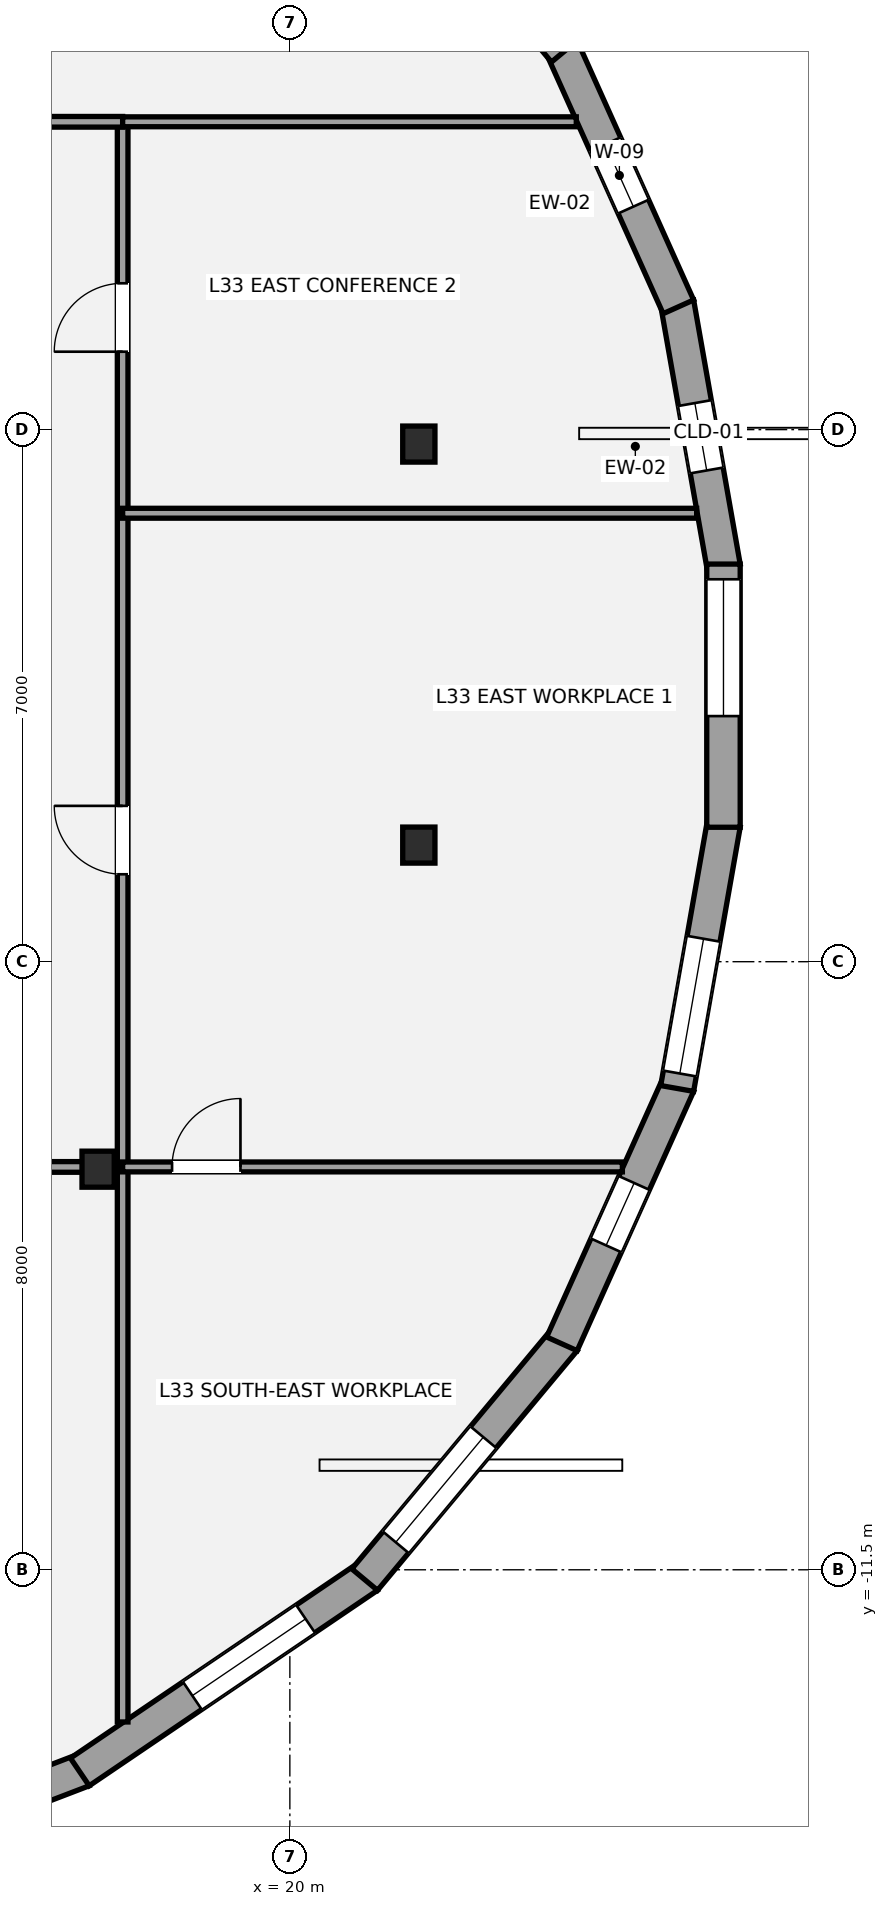
"""IFC4 building model, lengths in metres.
Left out: names, types, materials, properties, quantities, classifications, styles, units other than length and angle.
Written with IfcOpenShell. Run it as: python <this file> out.ifc"""

import sys

from ifc_helpers import new_model, si_unit, direction, frame, frame_2d, origin, origin_2d, place, context, subcontext, project, spatial, rectangle, i_section, extrude, element, fill, save


model = new_model("IFC4")
c1 = context("Model", 3, precision=1e-05, world=origin(), true_north=direction((0.0, 1.0)))
c2 = subcontext(c1, "Body", "Model", "MODEL_VIEW")
j1 = project(units=[si_unit("LENGTHUNIT", "METRE"), si_unit("PLANEANGLEUNIT", "RADIAN")], contexts=[c1])
p1 = place(None, origin())
s1 = spatial("IfcSite", under=j1, at=p1, CompositionType="ELEMENT")
p2 = place(p1, origin())
s2 = spatial("IfcBuilding", under=s1, at=p2, CompositionType="ELEMENT")
p3 = place(p2, frame((0.0, 0.0, 124.6)))
s3 = spatial("IfcBuildingStorey", under=s2, at=p3, CompositionType="ELEMENT", Elevation=124.6)
for number, where, z_axis, x_axis in (
    (1, (21.697, 3.31, 0.0), (0.0, 0.0, 1.0), (1.0, 0.0, 0.0)),
    (2, (17.477, -6.229, 0.0), (0.0, 0.0, 1.0), (1.0, 0.0, 0.0)),
    (3, (21.697, -1.966, 0.0), (0.0, 0.0, 1.0), (1.0, 0.0, 0.0)),
):
    element("IfcColumn", number, at=place(p3, frame(where, z_axis=z_axis, x_axis=x_axis)), inside=s3, PredefinedType="COLUMN", context=c2, shape_type="SweptSolid", body=[
        extrude(i_section(OverallWidth=0.424, OverallDepth=0.474, WebThickness=0.048, FlangeThickness=0.077, at=origin_2d()), origin(), (0.0, 0.0, 1.0), 3.5),
    ])
p4 = place(p3, frame((25.096, 5.168, 0.0), z_axis=(0.0, 0.0, 1.0), x_axis=(0.173615589384, -0.98481349865, 0.0)))
e4 = element("IfcWall", 4, at=p4, inside=s3, PredefinedType="STANDARD", context=c2, shape_type="SweptSolid", body=[
    extrude(rectangle(XDim=3.528, YDim=0.44, at=frame_2d((1.764, 0.0))), origin(), (0.0, 0.0, 1.0), 2.528),
])
p5 = place(p4, frame((1.339, 0.0, 0.58)))
e5 = element("IfcOpeningElement", 5, at=p5, cuts=e4, PredefinedType="OPENING", context=c2, shape_type="SweptSolid", body=[
    extrude(rectangle(XDim=0.9, YDim=1.35, at=frame_2d((0.45, 0.675))), frame((0.0, 0.23, 0.0), z_axis=(0.0, -1.0, 0.0), x_axis=(1.0, 0.0, 0.0)), (0.0, 0.0, 1.0), 0.46),
])
p6 = place(p3, frame((23.579, 8.528, 0.0), z_axis=(0.0, 0.0, 1.0), x_axis=(0.409835385481, -0.912159501846, 0.0)))
e6 = element("IfcWall", 6, at=p6, inside=s3, PredefinedType="STANDARD", context=c2, shape_type="SweptSolid", body=[
    extrude(rectangle(XDim=3.74, YDim=0.44, at=frame_2d((1.87, 0.0))), origin(), (0.0, 0.0, 1.0), 2.528),
])
p7 = place(p6, frame((1.395, 0.0, 0.58)))
e7 = element("IfcOpeningElement", 7, at=p7, cuts=e6, PredefinedType="OPENING", context=c2, shape_type="SweptSolid", body=[
    extrude(rectangle(XDim=0.9, YDim=1.35, at=frame_2d((0.45, 0.675))), frame((0.0, 0.23, 0.0), z_axis=(0.0, -1.0, 0.0), x_axis=(1.0, 0.0, 0.0)), (0.0, 0.0, 1.0), 0.46),
])
p8 = place(p3, frame((20.984, 11.629, 0.0), z_axis=(0.0, 0.0, 1.0), x_axis=(0.640084904994, -0.768304180906, 0.0)))
e8 = element("IfcWall", 8, at=p8, inside=s3, PredefinedType="STANDARD", context=c2, shape_type="SweptSolid", body=[
    extrude(rectangle(XDim=4.103, YDim=0.44, at=frame_2d((2.052, 0.0))), origin(), (0.0, 0.0, 1.0), 2.528),
])
p9 = place(p8, frame((1.664, 0.0, 0.65)))
e9 = element("IfcOpeningElement", 9, at=p9, cuts=e8, PredefinedType="OPENING", context=c2, shape_type="SweptSolid", body=[
    extrude(rectangle(XDim=1.8, YDim=1.7, at=frame_2d((0.9, 0.85))), frame((0.0, 0.23, 0.0), z_axis=(0.0, -1.0, 0.0), x_axis=(1.0, 0.0, 0.0)), (0.0, 0.0, 1.0), 0.46),
])
p10 = place(p3, frame((17.281, -14.136, 0.0), z_axis=(0.0, 0.0, 1.0), x_axis=(-0.933853964101, -0.357654545243, 0.0)))
e10 = element("IfcWall", 10, at=p10, inside=s3, PredefinedType="STANDARD", context=c2, shape_type="SweptSolid", body=[
    extrude(rectangle(XDim=4.979, YDim=0.44, at=frame_2d((2.49, 0.0))), origin(), (0.0, 0.0, 1.0), 2.528),
])
p11 = place(p10, frame((1.937, 0.0, 0.65)))
e11 = element("IfcOpeningElement", 11, at=p11, cuts=e10, PredefinedType="OPENING", context=c2, shape_type="SweptSolid", body=[
    extrude(rectangle(XDim=1.8, YDim=1.7, at=frame_2d((0.9, 0.85))), frame((0.0, 0.23, 0.0), z_axis=(0.0, -1.0, 0.0), x_axis=(1.0, 0.0, 0.0)), (0.0, 0.0, 1.0), 0.46),
])
p12 = place(p3, frame((21.03, -11.588, 0.0), z_axis=(0.0, 0.0, 1.0), x_axis=(-0.827672849676, -0.561210881852, 0.0)))
e12 = element("IfcWall", 12, at=p12, inside=s3, PredefinedType="STANDARD", context=c2, shape_type="SweptSolid", body=[
    extrude(rectangle(XDim=4.583, YDim=0.44, at=frame_2d((2.292, 0.0))), origin(), (0.0, 0.0, 1.0), 2.528),
])
p13 = place(p12, frame((0.994, 0.0, 0.65)))
e13 = element("IfcOpeningElement", 13, at=p13, cuts=e12, PredefinedType="OPENING", context=c2, shape_type="SweptSolid", body=[
    extrude(rectangle(XDim=1.8, YDim=1.7, at=frame_2d((0.9, 0.85))), frame((0.0, 0.23, 0.0), z_axis=(0.0, -1.0, 0.0), x_axis=(1.0, 0.0, 0.0)), (0.0, 0.0, 1.0), 0.46),
])
p14 = place(p3, frame((23.611, -8.477, 0.0), z_axis=(0.0, 0.0, 1.0), x_axis=(-0.640084904994, -0.768304180906, 0.0)))
e14 = element("IfcWall", 14, at=p14, inside=s3, PredefinedType="STANDARD", context=c2, shape_type="SweptSolid", body=[
    extrude(rectangle(XDim=4.103, YDim=0.44, at=frame_2d((2.052, 0.0))), origin(), (0.0, 0.0, 1.0), 2.528),
])
p15 = place(p14, frame((1.664, 0.0, 0.65)))
e15 = element("IfcOpeningElement", 15, at=p15, cuts=e14, PredefinedType="OPENING", context=c2, shape_type="SweptSolid", body=[
    extrude(rectangle(XDim=1.8, YDim=1.7, at=frame_2d((0.9, 0.85))), frame((0.0, 0.23, 0.0), z_axis=(0.0, -1.0, 0.0), x_axis=(1.0, 0.0, 0.0)), (0.0, 0.0, 1.0), 0.46),
])
p16 = place(p3, frame((25.112, -5.116, 0.0), z_axis=(0.0, 0.0, 1.0), x_axis=(-0.409835385481, -0.912159501846, 0.0)))
e16 = element("IfcWall", 16, at=p16, inside=s3, PredefinedType="STANDARD", context=c2, shape_type="SweptSolid", body=[
    extrude(rectangle(XDim=3.74, YDim=0.44, at=frame_2d((1.87, 0.0))), origin(), (0.0, 0.0, 1.0), 2.528),
])
p17 = place(p16, frame((1.42, 0.0, 0.58)))
e17 = element("IfcOpeningElement", 17, at=p17, cuts=e16, PredefinedType="OPENING", context=c2, shape_type="SweptSolid", body=[
    extrude(rectangle(XDim=0.9, YDim=1.35, at=frame_2d((0.45, 0.675))), frame((0.0, 0.23, 0.0), z_axis=(0.0, -1.0, 0.0), x_axis=(1.0, 0.0, 0.0)), (0.0, 0.0, 1.0), 0.46),
])
p18 = place(p3, frame((25.708, -1.693, 0.0), z_axis=(0.0, 0.0, 1.0), x_axis=(-0.173615589384, -0.98481349865, 0.0)))
e18 = element("IfcWall", 18, at=p18, inside=s3, PredefinedType="STANDARD", context=c2, shape_type="SweptSolid", body=[
    extrude(rectangle(XDim=3.528, YDim=0.44, at=frame_2d((1.764, 0.0))), origin(), (0.0, 0.0, 1.0), 2.528),
])
p19 = place(p18, frame((1.528, 0.0, 0.65)))
e19 = element("IfcOpeningElement", 19, at=p19, cuts=e18, PredefinedType="OPENING", context=c2, shape_type="SweptSolid", body=[
    extrude(rectangle(XDim=1.8, YDim=1.7, at=frame_2d((0.9, 0.85))), frame((0.0, 0.23, 0.0), z_axis=(0.0, -1.0, 0.0), x_axis=(1.0, 0.0, 0.0)), (0.0, 0.0, 1.0), 0.46),
])
p20 = place(p3, frame((25.705, 1.731, 0.0), z_axis=(0.0, 0.0, 1.0), x_axis=(0.0, -1.0, 0.0)))
e20 = element("IfcWall", 20, at=p20, inside=s3, PredefinedType="STANDARD", context=c2, shape_type="SweptSolid", body=[
    extrude(rectangle(XDim=3.462, YDim=0.44, at=frame_2d((1.731, 0.0))), origin(), (0.0, 0.0, 1.0), 2.528),
])
p21 = place(p20, frame((0.2, 0.0, 0.48)))
e21 = element("IfcOpeningElement", 21, at=p21, cuts=e20, PredefinedType="OPENING", context=c2, shape_type="SweptSolid", body=[
    extrude(rectangle(XDim=1.8, YDim=1.7, at=frame_2d((0.9, 0.85))), frame((0.0, 0.23, 0.0), z_axis=(0.0, -1.0, 0.0), x_axis=(1.0, 0.0, 0.0)), (0.0, 0.0, 1.0), 0.46),
])
p22 = place(p3, frame((-16.2, -6.2, 0.0), z_axis=(0.0, 0.0, 1.0), x_axis=(1.0, 0.0, 0.0)))
e22 = element("IfcWall", 22, at=p22, inside=s3, PredefinedType="PARTITIONING", context=c2, shape_type="SweptSolid", body=[
    extrude(rectangle(XDim=34.0, YDim=0.14, at=frame_2d((17.0, 0.0))), origin(), (0.0, 0.0, 1.0), 2.688),
])
p23 = place(p22, frame((2.75, 0.0, 0.0)))
e23 = element("IfcOpeningElement", 23, at=p23, cuts=e22, PredefinedType="OPENING", context=c2, shape_type="SweptSolid", body=[
    extrude(rectangle(XDim=0.9, YDim=2.1, at=frame_2d((0.45, 1.05))), frame((0.0, 0.08, 0.0), z_axis=(0.0, -1.0, 0.0), x_axis=(1.0, 0.0, 0.0)), (0.0, 0.0, 1.0), 0.16),
])
p24 = place(p22, frame((9.45, 0.0, 0.0)))
e24 = element("IfcOpeningElement", 24, at=p24, cuts=e22, PredefinedType="OPENING", context=c2, shape_type="SweptSolid", body=[
    extrude(rectangle(XDim=0.9, YDim=2.1, at=frame_2d((0.45, 1.05))), frame((0.0, 0.08, 0.0), z_axis=(0.0, -1.0, 0.0), x_axis=(1.0, 0.0, 0.0)), (0.0, 0.0, 1.0), 0.16),
])
p25 = place(p22, frame((16.45, 0.0, 0.0)))
e25 = element("IfcOpeningElement", 25, at=p25, cuts=e22, PredefinedType="OPENING", context=c2, shape_type="SweptSolid", body=[
    extrude(rectangle(XDim=0.9, YDim=2.1, at=frame_2d((0.45, 1.05))), frame((0.0, 0.08, 0.0), z_axis=(0.0, -1.0, 0.0), x_axis=(1.0, 0.0, 0.0)), (0.0, 0.0, 1.0), 0.16),
])
p26 = place(p22, frame((22.95, 0.0, 0.0)))
e26 = element("IfcOpeningElement", 26, at=p26, cuts=e22, PredefinedType="OPENING", context=c2, shape_type="SweptSolid", body=[
    extrude(rectangle(XDim=0.9, YDim=2.1, at=frame_2d((0.45, 1.05))), frame((0.0, 0.08, 0.0), z_axis=(0.0, -1.0, 0.0), x_axis=(1.0, 0.0, 0.0)), (0.0, 0.0, 1.0), 0.16),
])
p27 = place(p22, frame((29.45, 0.0, 0.0)))
e27 = element("IfcOpeningElement", 27, at=p27, cuts=e22, PredefinedType="OPENING", context=c2, shape_type="SweptSolid", body=[
    extrude(rectangle(XDim=1.5, YDim=2.15, at=frame_2d((0.75, 1.075))), frame((0.0, 0.08, 0.0), z_axis=(0.0, -1.0, 0.0), x_axis=(1.0, 0.0, 0.0)), (0.0, 0.0, 1.0), 0.16),
])
p28 = place(p3, frame((17.8, -13.502, 0.0), z_axis=(0.0, 0.0, 1.0), x_axis=(0.0, 1.0, 0.0)))
e28 = element("IfcWall", 28, at=p28, inside=s3, PredefinedType="PARTITIONING", context=c2, shape_type="SweptSolid", body=[
    extrude(rectangle(XDim=21.052, YDim=0.14, at=frame_2d((10.526, 0.0))), origin(), (0.0, 0.0, 1.0), 2.688),
])
p29 = place(p28, frame((11.153, 0.0, 0.0)))
e29 = element("IfcOpeningElement", 29, at=p29, cuts=e28, PredefinedType="OPENING", context=c2, shape_type="SweptSolid", body=[
    extrude(rectangle(XDim=0.9, YDim=2.1, at=frame_2d((0.45, 1.05))), frame((0.0, 0.08, 0.0), z_axis=(0.0, -1.0, 0.0), x_axis=(1.0, 0.0, 0.0)), (0.0, 0.0, 1.0), 0.16),
])
p30 = place(p28, frame((18.028, 0.0, 0.0)))
e30 = element("IfcOpeningElement", 30, at=p30, cuts=e28, PredefinedType="OPENING", context=c2, shape_type="SweptSolid", body=[
    extrude(rectangle(XDim=0.9, YDim=2.1, at=frame_2d((0.45, 1.05))), frame((0.0, 0.08, 0.0), z_axis=(0.0, -1.0, 0.0), x_axis=(1.0, 0.0, 0.0)), (0.0, 0.0, 1.0), 0.16),
])
p31 = place(p3, frame((13.9, 7.55, 0.0), z_axis=(0.0, 0.0, 1.0), x_axis=(1.0, 0.0, 0.0)))
e31 = element("IfcWall", 31, at=p31, inside=s3, PredefinedType="PARTITIONING", context=c2, shape_type="SweptSolid", body=[
    extrude(rectangle(XDim=3.9, YDim=0.14, at=frame_2d((1.95, 0.0))), origin(), (0.0, 0.0, 1.0), 2.763),
])
p32 = place(p31, frame((0.32, 0.0, 0.0)))
e32 = element("IfcOpeningElement", 32, at=p32, cuts=e31, PredefinedType="OPENING", context=c2, shape_type="SweptSolid", body=[
    extrude(rectangle(XDim=0.92, YDim=2.15, at=frame_2d((0.46, 1.075))), frame((0.0, 0.08, 0.0), z_axis=(0.0, -1.0, 0.0), x_axis=(1.0, 0.0, 0.0)), (0.0, 0.0, 1.0), 0.16),
])
p33 = place(p3, frame((17.8, 7.55, 0.0), z_axis=(0.0, 0.0, 1.0), x_axis=(1.0, 0.0, 0.0)))
e33 = element("IfcWall", 33, at=p33, inside=s3, PredefinedType="PARTITIONING", context=c2, shape_type="SweptSolid", body=[
    extrude(rectangle(XDim=5.968, YDim=0.13, at=frame_2d((2.984, 0.0))), origin(), (0.0, 0.0, 1.0), 2.763),
])
p34 = place(p3, frame((17.8, -6.2, 0.0), z_axis=(0.0, 0.0, 1.0), x_axis=(1.0, 0.0, 0.0)))
e34 = element("IfcWall", 34, at=p34, inside=s3, PredefinedType="PARTITIONING", context=c2, shape_type="SweptSolid", body=[
    extrude(rectangle(XDim=6.575, YDim=0.13, at=frame_2d((3.288, 0.0))), origin(), (0.0, 0.0, 1.0), 2.763),
])
p35 = place(p34, frame((0.65, 0.0, 0.0)))
e35 = element("IfcOpeningElement", 35, at=p35, cuts=e34, PredefinedType="OPENING", context=c2, shape_type="SweptSolid", body=[
    extrude(rectangle(XDim=0.9, YDim=2.1, at=frame_2d((0.45, 1.05))), frame((0.0, 0.075, 0.0), z_axis=(0.0, -1.0, 0.0), x_axis=(1.0, 0.0, 0.0)), (0.0, 0.0, 1.0), 0.15),
])
p36 = place(p3, frame((17.8, 2.4, 0.0), z_axis=(0.0, 0.0, 1.0), x_axis=(1.0, 0.0, 0.0)))
e36 = element("IfcWall", 36, at=p36, inside=s3, PredefinedType="PARTITIONING", context=c2, shape_type="SweptSolid", body=[
    extrude(rectangle(XDim=7.552, YDim=0.13, at=frame_2d((3.776, 0.0))), origin(), (0.0, 0.0, 1.0), 2.763),
])
p37 = place(p5, origin())
e37 = element("IfcWindow", 37, at=p37, inside=s3, PartitioningType="SINGLE_PANEL", PredefinedType="WINDOW", context=c2, shape_type="SweptSolid", body=[
    extrude(rectangle(XDim=0.9, YDim=1.35, at=frame_2d((0.45, 0.675))), frame((0.0, -0.01, 0.0), z_axis=(0.0, -1.0, 0.0), x_axis=(1.0, 0.0, 0.0)), (0.0, 0.0, 1.0), 0.06),
])
fill(e5, e37)
p38 = place(p7, origin())
e38 = element("IfcWindow", 38, at=p38, inside=s3, PartitioningType="SINGLE_PANEL", PredefinedType="WINDOW", context=c2, shape_type="SweptSolid", body=[
    extrude(rectangle(XDim=0.9, YDim=1.35, at=frame_2d((0.45, 0.675))), frame((0.0, -0.01, 0.0), z_axis=(0.0, -1.0, 0.0), x_axis=(1.0, 0.0, 0.0)), (0.0, 0.0, 1.0), 0.06),
])
fill(e7, e38)
p39 = place(p13, origin())
e39 = element("IfcWindow", 39, at=p39, inside=s3, PartitioningType="SINGLE_PANEL", PredefinedType="WINDOW", context=c2, shape_type="SweptSolid", body=[
    extrude(rectangle(XDim=1.8, YDim=1.7, at=frame_2d((0.9, 0.85))), frame((0.0, -0.01, 0.0), z_axis=(0.0, -1.0, 0.0), x_axis=(1.0, 0.0, 0.0)), (0.0, 0.0, 1.0), 0.06),
])
fill(e13, e39)
p40 = place(p15, origin())
e40 = element("IfcWindow", 40, at=p40, inside=s3, PartitioningType="SINGLE_PANEL", PredefinedType="WINDOW", context=c2, shape_type="SweptSolid", body=[
    extrude(rectangle(XDim=1.8, YDim=1.7, at=frame_2d((0.9, 0.85))), frame((0.0, -0.01, 0.0), z_axis=(0.0, -1.0, 0.0), x_axis=(1.0, 0.0, 0.0)), (0.0, 0.0, 1.0), 0.06),
])
fill(e15, e40)
p41 = place(p17, origin())
e41 = element("IfcWindow", 41, at=p41, inside=s3, PartitioningType="SINGLE_PANEL", PredefinedType="WINDOW", context=c2, shape_type="SweptSolid", body=[
    extrude(rectangle(XDim=0.9, YDim=1.35, at=frame_2d((0.45, 0.675))), frame((0.0, -0.01, 0.0), z_axis=(0.0, -1.0, 0.0), x_axis=(1.0, 0.0, 0.0)), (0.0, 0.0, 1.0), 0.06),
])
fill(e17, e41)
p42 = place(p19, origin())
e42 = element("IfcWindow", 42, at=p42, inside=s3, PartitioningType="SINGLE_PANEL", PredefinedType="WINDOW", context=c2, shape_type="SweptSolid", body=[
    extrude(rectangle(XDim=1.8, YDim=1.7, at=frame_2d((0.9, 0.85))), frame((0.0, -0.01, 0.0), z_axis=(0.0, -1.0, 0.0), x_axis=(1.0, 0.0, 0.0)), (0.0, 0.0, 1.0), 0.06),
])
fill(e19, e42)
p43 = place(p21, origin())
e43 = element("IfcWindow", 43, at=p43, inside=s3, PartitioningType="SINGLE_PANEL", PredefinedType="WINDOW", context=c2, shape_type="SweptSolid", body=[
    extrude(rectangle(XDim=1.8, YDim=1.7, at=frame_2d((0.9, 0.85))), frame((0.0, -0.01, 0.0), z_axis=(0.0, -1.0, 0.0), x_axis=(1.0, 0.0, 0.0)), (0.0, 0.0, 1.0), 0.06),
])
fill(e21, e43)
p44 = place(p35, origin())
e44 = element("IfcDoor", 44, at=p44, inside=s3, OperationType="SINGLE_SWING_RIGHT", PredefinedType="DOOR", context=c2, shape_type="SweptSolid", body=[
    extrude(rectangle(XDim=0.9, YDim=2.1, at=frame_2d((0.45, 1.05))), frame((0.0, 0.025, 0.0), z_axis=(0.0, -1.0, 0.0), x_axis=(1.0, 0.0, 0.0)), (0.0, 0.0, 1.0), 0.05),
])
fill(e35, e44)
p45 = place(p29, origin())
e45 = element("IfcDoor", 45, at=p45, inside=s3, OperationType="SINGLE_SWING_RIGHT", PredefinedType="DOOR", context=c2, shape_type="SweptSolid", body=[
    extrude(rectangle(XDim=0.9, YDim=2.1, at=frame_2d((0.45, 1.05))), frame((0.0, 0.025, 0.0), z_axis=(0.0, -1.0, 0.0), x_axis=(1.0, 0.0, 0.0)), (0.0, 0.0, 1.0), 0.05),
])
fill(e29, e45)
p46 = place(p30, origin())
e46 = element("IfcDoor", 46, at=p46, inside=s3, OperationType="SINGLE_SWING_LEFT", PredefinedType="DOOR", context=c2, shape_type="SweptSolid", body=[
    extrude(rectangle(XDim=0.9, YDim=2.1, at=frame_2d((0.45, 1.05))), frame((0.0, 0.025, 0.0), z_axis=(0.0, -1.0, 0.0), x_axis=(1.0, 0.0, 0.0)), (0.0, 0.0, 1.0), 0.05),
])
fill(e30, e46)
save(model, sys.argv[1])
